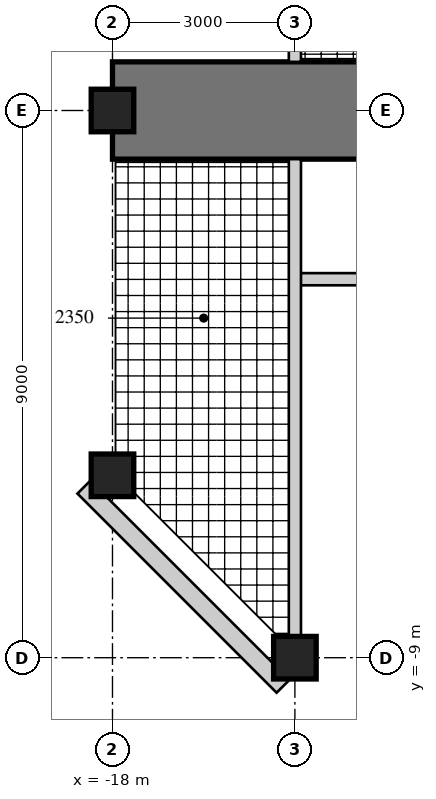
"""IFC4 building model, lengths in metres.
Left out: names, types, materials, properties, quantities, classifications, styles, units other than length and angle.
Written with IfcOpenShell. Run it as: python <this file> out.ifc"""

import sys

from ifc_helpers import new_model, si_unit, direction, frame, frame_2d, origin, origin_2d, place, context, subcontext, project, spatial, rectangle, hollow_rectangle, extrude, element, fill, save


model = new_model("IFC4")
c1 = context("Model", 3, precision=1e-05, world=origin(), true_north=direction((0.0, 1.0)))
c2 = subcontext(c1, "Body", "Model", "MODEL_VIEW")
j1 = project(units=[si_unit("LENGTHUNIT", "METRE"), si_unit("PLANEANGLEUNIT", "RADIAN")], contexts=[c1])
p1 = place(None, origin())
s1 = spatial("IfcSite", under=j1, at=p1, CompositionType="ELEMENT")
p2 = place(p1, origin())
s2 = spatial("IfcBuilding", under=s1, at=p2, CompositionType="ELEMENT")
p3 = place(p2, frame((0.0, 0.0, 261.1)))
s3 = spatial("IfcBuildingStorey", under=s2, at=p3, CompositionType="ELEMENT", Elevation=261.1)
p4 = place(p3, frame((-9.0, 0.0, 0.0), z_axis=(0.0, 0.0, 1.0), x_axis=(-1.0, 0.0, 0.0)))
e1 = element("IfcWall", 1, at=p4, inside=s3, PredefinedType="SHEAR", context=c2, shape_type="SweptSolid", body=[
    extrude(rectangle(XDim=9.0, YDim=1.6, at=frame_2d((4.5, 0.0))), origin(), (0.0, 0.0, 1.0), 3.4),
])
p5 = place(p4, frame((3.8, 0.0, 0.0)))
e2 = element("IfcOpeningElement", 2, at=p5, cuts=e1, PredefinedType="OPENING", context=c2, shape_type="SweptSolid", body=[
    extrude(rectangle(XDim=1.0, YDim=2.15, at=frame_2d((0.5, 1.075))), frame((0.0, 0.81, 0.0), z_axis=(0.0, -1.0, 0.0), x_axis=(1.0, 0.0, 0.0)), (0.0, 0.0, 1.0), 1.62),
])
p6 = place(p4, frame((7.0, 0.0, 0.0)))
e3 = element("IfcOpeningElement", 3, at=p6, cuts=e1, PredefinedType="OPENING", context=c2, shape_type="SweptSolid", body=[
    extrude(rectangle(XDim=1.0, YDim=2.2, at=frame_2d((0.5, 1.1))), frame((0.0, 0.81, 0.0), z_axis=(0.0, -1.0, 0.0), x_axis=(1.0, 0.0, 0.0)), (0.0, 0.0, 1.0), 1.62),
])
for number, where, z_axis, x_axis in (
    (4, (-15.0, -9.0, 0.0), (0.0, 0.0, 1.0), (1.0, 0.0, 0.0)),
    (5, (-18.0, 0.0, 0.0), (0.0, 0.0, 1.0), (1.0, 0.0, 0.0)),
    (6, (-18.0, -6.0, 0.0), (0.0, 0.0, 1.0), (1.0, 0.0, 0.0)),
):
    element("IfcColumn", number, at=place(p3, frame(where, z_axis=z_axis, x_axis=x_axis)), inside=s3, PredefinedType="COLUMN", context=c2, shape_type="SweptSolid", body=[
        extrude(rectangle(XDim=0.7, YDim=0.7, at=origin_2d()), origin(), (0.0, 0.0, 1.0), 3.4),
    ])
p7 = place(p3, frame((-18.47, -6.195, 0.0), z_axis=(0.0, 0.0, 1.0), x_axis=(0.707106781187, -0.707106781187, 0.0)))
e7 = element("IfcWall", 7, at=p7, inside=s3, PredefinedType="SOLIDWALL", context=c2, shape_type="SweptSolid", body=[
    extrude(rectangle(XDim=4.632, YDim=0.3, at=frame_2d((2.316, 0.0))), origin(), (0.0, 0.0, 1.0), 3.22),
])
p8 = place(p7, frame((1.866, 0.0, 0.3)))
e8 = element("IfcOpeningElement", 8, at=p8, cuts=e7, PredefinedType="OPENING", context=c2, shape_type="SweptSolid", body=[
    extrude(rectangle(XDim=0.9, YDim=2.4, at=frame_2d((0.45, 1.2))), frame((0.0, 0.16, 0.0), z_axis=(0.0, -1.0, 0.0), x_axis=(1.0, 0.0, 0.0)), (0.0, 0.0, 1.0), 0.32),
])
p9 = place(p3, frame((-9.4, -2.775, 0.0), z_axis=(0.0, 0.0, 1.0), x_axis=(-1.0, 0.0, 0.0)))
e9 = element("IfcWall", 9, at=p9, inside=s3, PredefinedType="SOLIDWALL", context=c2, shape_type="SweptSolid", body=[
    extrude(rectangle(XDim=5.6, YDim=0.2, at=frame_2d((2.8, 0.0))), origin(), (0.0, 0.0, 1.0), 3.22),
])
p10 = place(p9, frame((3.75, 0.0, 0.0)))
e10 = element("IfcOpeningElement", 10, at=p10, cuts=e9, PredefinedType="OPENING", context=c2, shape_type="SweptSolid", body=[
    extrude(rectangle(XDim=1.0, YDim=2.15, at=frame_2d((0.5, 1.075))), frame((0.0, 0.11, 0.0), z_axis=(0.0, -1.0, 0.0), x_axis=(1.0, 0.0, 0.0)), (0.0, 0.0, 1.0), 0.22),
])
p11 = place(p3, frame((-15.0, 8.65, 0.0), z_axis=(0.0, 0.0, 1.0), x_axis=(0.0, -1.0, 0.0)))
e11 = element("IfcWall", 11, at=p11, inside=s3, PredefinedType="SOLIDWALL", context=c2, shape_type="SweptSolid", body=[
    extrude(rectangle(XDim=7.85, YDim=0.2, at=frame_2d((3.925, 0.0))), origin(), (0.0, 0.0, 1.0), 2.52),
])
p12 = place(p3, frame((-15.0, -0.8, 0.0), z_axis=(0.0, 0.0, 1.0), x_axis=(0.0, -1.0, 0.0)))
e12 = element("IfcWall", 12, at=p12, inside=s3, PredefinedType="SOLIDWALL", context=c2, shape_type="SweptSolid", body=[
    extrude(rectangle(XDim=7.85, YDim=0.2, at=frame_2d((3.925, 0.0))), origin(), (0.0, 0.0, 1.0), 2.52),
])
p13 = place(p12, frame((0.35, 0.0, 0.0)))
e13 = element("IfcOpeningElement", 13, at=p13, cuts=e12, PredefinedType="OPENING", context=c2, shape_type="SweptSolid", body=[
    extrude(rectangle(XDim=1.0, YDim=2.2, at=frame_2d((0.5, 1.1))), frame((0.0, 0.11, 0.0), z_axis=(0.0, -1.0, 0.0), x_axis=(1.0, 0.0, 0.0)), (0.0, 0.0, 1.0), 0.22),
])
p14 = place(p8, origin())
e14 = element("IfcWindow", 14, at=p14, inside=s3, PartitioningType="SINGLE_PANEL", PredefinedType="WINDOW", context=c2, shape_type="SweptSolid", body=[
    extrude(hollow_rectangle(XDim=0.9, YDim=2.4, WallThickness=0.06, at=frame_2d((0.45, 1.2))), frame((0.0, 0.03, 0.0), z_axis=(0.0, -1.0, 0.0), x_axis=(1.0, 0.0, 0.0)), (0.0, 0.0, 1.0), 0.06),
    extrude(rectangle(XDim=0.779, YDim=2.279, at=frame_2d((0.45, 1.2))), frame((0.0, 0.03, 0.0), z_axis=(0.0, -1.0, 0.0), x_axis=(1.0, 0.0, 0.0)), (0.0, 0.0, 1.0), 0.06),
])
fill(e8, e14)
p15 = place(p10, origin())
e15 = element("IfcDoor", 15, at=p15, inside=s3, OperationType="SINGLE_SWING_LEFT", PredefinedType="DOOR", context=c2, shape_type="SweptSolid", body=[
    extrude(rectangle(XDim=1.0, YDim=2.15, at=frame_2d((0.5, 1.075))), frame((0.0, 0.025, 0.0), z_axis=(0.0, -1.0, 0.0), x_axis=(1.0, 0.0, 0.0)), (0.0, 0.0, 1.0), 0.05),
])
fill(e10, e15)
p16 = place(p13, frame((1.0, 0.0, 0.0), z_axis=(0.0, 0.0, 1.0), x_axis=(-1.0, 0.0, 0.0)))
e16 = element("IfcDoor", 16, at=p16, inside=s3, OperationType="SINGLE_SWING_RIGHT", PredefinedType="DOOR", context=c2, shape_type="SweptSolid", body=[
    extrude(rectangle(XDim=1.0, YDim=2.2, at=frame_2d((0.5, 1.1))), frame((0.0, 0.025, 0.0), z_axis=(0.0, -1.0, 0.0), x_axis=(1.0, 0.0, 0.0)), (0.0, 0.0, 1.0), 0.05),
])
fill(e13, e16)
p17 = place(p6, frame((1.0, 0.0, 0.0), z_axis=(0.0, 0.0, 1.0), x_axis=(-1.0, 0.0, 0.0)))
e17 = element("IfcDoor", 17, at=p17, inside=s3, OperationType="SINGLE_SWING_RIGHT", PredefinedType="DOOR", context=c2, shape_type="SweptSolid", body=[
    extrude(rectangle(XDim=1.0, YDim=2.2, at=frame_2d((0.5, 1.1))), frame((0.0, 0.025, 0.0), z_axis=(0.0, -1.0, 0.0), x_axis=(1.0, 0.0, 0.0)), (0.0, 0.0, 1.0), 0.05),
])
fill(e3, e17)
save(model, sys.argv[1])
